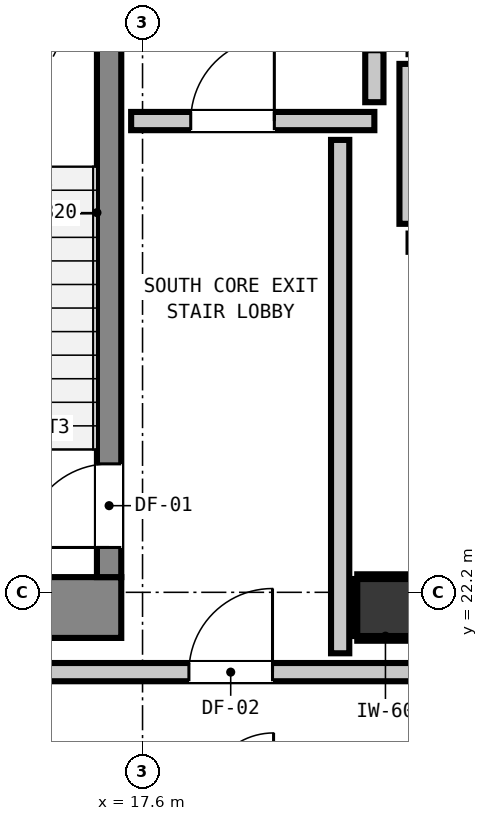
"""IFC4 building model, lengths in metres.
Left out: names, types, materials, properties, quantities, classifications, styles, units other than length and angle.
Written with IfcOpenShell. Run it as: python <this file> out.ifc"""

import sys

from ifc_helpers import new_model, si_unit, direction, frame, frame_2d, origin, origin_2d, place, context, subcontext, project, spatial, rectangle, extrude, element, fill, save


model = new_model("IFC4")
c1 = context("Model", 3, precision=1e-05, world=origin(), true_north=direction((0.0, 1.0)))
c2 = subcontext(c1, "Body", "Model", "MODEL_VIEW")
j1 = project(units=[si_unit("LENGTHUNIT", "METRE"), si_unit("PLANEANGLEUNIT", "RADIAN")], contexts=[c1])
p1 = place(None, origin())
s1 = spatial("IfcSite", under=j1, at=p1, CompositionType="ELEMENT")
p2 = place(p1, origin())
s2 = spatial("IfcBuilding", under=s1, at=p2, CompositionType="ELEMENT")
p3 = place(p2, frame((0.0, 0.0, 226.68)))
s3 = spatial("IfcBuildingStorey", under=s2, at=p3, CompositionType="ELEMENT", Elevation=226.68)
p4 = place(p3, frame((20.8, 22.0, 0.0), z_axis=(0.0, 0.0, 1.0), x_axis=(1.0, 0.0, 0.0)))
e1 = element("IfcColumn", 1, at=p4, inside=s3, PredefinedType="COLUMN", context=c2, shape_type="SweptSolid", body=[
    extrude(rectangle(XDim=0.75, YDim=0.75, at=origin_2d()), origin(), (0.0, 0.0, 1.0), 4.6),
])
p5 = place(p3, frame((13.24, 22.0, 0.0), z_axis=(0.0, 0.0, 1.0), x_axis=(1.0, 0.0, 0.0)))
e2 = element("IfcWall", 2, at=p5, inside=s3, PredefinedType="SHEAR", context=c2, shape_type="SweptSolid", body=[
    extrude(rectangle(XDim=4.08, YDim=0.8, at=frame_2d((2.04, 0.0))), origin(), (0.0, 0.0, 1.0), 4.6),
])
p6 = place(p3, frame((17.16, 22.4, 0.0), z_axis=(0.0, 0.0, 1.0), x_axis=(0.0, 1.0, 0.0)))
e3 = element("IfcWall", 3, at=p6, inside=s3, PredefinedType="SHEAR", context=c2, shape_type="SweptSolid", body=[
    extrude(rectangle(XDim=8.0, YDim=0.32, at=frame_2d((4.0, 0.0))), origin(), (0.0, 0.0, 1.0), 4.6),
])
p7 = place(p6, frame((0.39, 0.0, 0.0)))
e4 = element("IfcOpeningElement", 4, at=p7, cuts=e3, PredefinedType="OPENING", context=c2, shape_type="SweptSolid", body=[
    extrude(rectangle(XDim=1.1, YDim=2.15, at=frame_2d((0.55, 1.075))), frame((0.0, 0.17, 0.0), z_axis=(0.0, -1.0, 0.0), x_axis=(1.0, 0.0, 0.0)), (0.0, 0.0, 1.0), 0.34),
])
for number, where, z_axis, x_axis in (
    (5, (21.1, 26.8, 0.0), (0.0, 0.0, 1.0), (1.0, 0.0, 0.0)),
    (6, (21.1, 29.4, 0.0), (0.0, 0.0, 1.0), (1.0, 0.0, 0.0)),
):
    element("IfcWall", number, at=place(p3, frame(where, z_axis=z_axis, x_axis=x_axis)), inside=s3, PredefinedType="PARTITIONING", context=c2, shape_type="SweptSolid", body=[
        extrude(rectangle(XDim=2.2, YDim=0.24, at=frame_2d((1.1, 0.0))), origin(), (0.0, 0.0, 1.0), 4.18),
    ])
p8 = place(p3, frame((21.1, 27.048, 0.0), z_axis=(0.0, 0.0, 1.0), x_axis=(0.0, 1.0, 0.0)))
e7 = element("IfcWall", 7, at=p8, inside=s3, PredefinedType="PARTITIONING", context=c2, shape_type="SweptSolid", body=[
    extrude(rectangle(XDim=2.104, YDim=0.24, at=frame_2d((1.052, 0.0))), origin(), (0.0, 0.0, 1.0), 2.185),
])
p9 = place(p3, frame((10.787, 21.15, 0.0), z_axis=(0.0, 0.0, 1.0), x_axis=(1.0, 0.0, 0.0)))
e8 = element("IfcWall", 8, at=p9, inside=s3, PredefinedType="PARTITIONING", context=c2, shape_type="SweptSolid", body=[
    extrude(rectangle(XDim=36.626, YDim=0.24, at=frame_2d((18.313, 0.0))), origin(), (0.0, 0.0, 1.0), 4.18),
])
p10 = place(p9, frame((7.423, 0.0, 0.0)))
e9 = element("IfcOpeningElement", 9, at=p10, cuts=e8, PredefinedType="OPENING", context=c2, shape_type="SweptSolid", body=[
    extrude(rectangle(XDim=1.1, YDim=2.15, at=frame_2d((0.55, 1.075))), frame((0.0, 0.13, 0.0), z_axis=(0.0, -1.0, 0.0), x_axis=(1.0, 0.0, 0.0)), (0.0, 0.0, 1.0), 0.26),
])
p11 = place(p9, frame((1.012, 0.0, 0.0)))
e10 = element("IfcOpeningElement", 10, at=p11, cuts=e8, PredefinedType="OPENING", context=c2, shape_type="SweptSolid", body=[
    extrude(rectangle(XDim=1.0, YDim=2.15, at=frame_2d((0.5, 1.075))), frame((0.0, 0.13, 0.0), z_axis=(0.0, -1.0, 0.0), x_axis=(1.0, 0.0, 0.0)), (0.0, 0.0, 1.0), 0.26),
])
p12 = place(p9, frame((27.239, 0.0, 0.0)))
e11 = element("IfcOpeningElement", 11, at=p12, cuts=e8, PredefinedType="OPENING", context=c2, shape_type="SweptSolid", body=[
    extrude(rectangle(XDim=1.4, YDim=2.15, at=frame_2d((0.7, 1.075))), frame((0.0, 0.13, 0.0), z_axis=(0.0, -1.0, 0.0), x_axis=(1.0, 0.0, 0.0)), (0.0, 0.0, 1.0), 0.26),
])
p13 = place(p3, frame((17.45, 28.4, 0.0), z_axis=(0.0, 0.0, 1.0), x_axis=(1.0, 0.0, 0.0)))
e12 = element("IfcWall", 12, at=p13, inside=s3, PredefinedType="PARTITIONING", context=c2, shape_type="SweptSolid", body=[
    extrude(rectangle(XDim=3.2, YDim=0.24, at=frame_2d((1.6, 0.0))), origin(), (0.0, 0.0, 1.0), 4.18),
])
p14 = place(p13, frame((0.784, 0.0, 0.0)))
e13 = element("IfcOpeningElement", 13, at=p14, cuts=e12, PredefinedType="OPENING", context=c2, shape_type="SweptSolid", body=[
    extrude(rectangle(XDim=1.1, YDim=2.15, at=frame_2d((0.55, 1.075))), frame((0.0, 0.13, 0.0), z_axis=(0.0, -1.0, 0.0), x_axis=(1.0, 0.0, 0.0)), (0.0, 0.0, 1.0), 0.26),
])
p15 = place(p3, frame((20.2, 21.398, 0.0), z_axis=(0.0, 0.0, 1.0), x_axis=(0.0, 1.0, 0.0)))
e14 = element("IfcWall", 14, at=p15, inside=s3, PredefinedType="PARTITIONING", context=c2, shape_type="SweptSolid", body=[
    extrude(rectangle(XDim=6.754, YDim=0.24, at=frame_2d((3.377, 0.0))), origin(), (0.0, 0.0, 1.0), 2.185),
])
p16 = place(p3, frame((20.65, 28.648, 0.0), z_axis=(0.0, 0.0, 1.0), x_axis=(0.0, 1.0, 0.0)))
e15 = element("IfcWall", 15, at=p16, inside=s3, PredefinedType="PARTITIONING", context=c2, shape_type="SweptSolid", body=[
    extrude(rectangle(XDim=0.684, YDim=0.24, at=frame_2d((0.342, 0.0))), origin(), (0.0, 0.0, 1.0), 2.185),
])
for number, where, z_axis, x_axis in (
    (16, (20.425, 21.593, 0.0), (0.0, 0.0, 1.0), (1.0, 0.0, 0.0)),
    (17, (20.425, 22.407, 0.0), (0.0, 0.0, 1.0), (1.0, 0.0, 0.0)),
):
    element("IfcWall", number, at=place(p3, frame(where, z_axis=z_axis, x_axis=x_axis)), inside=s3, PredefinedType="PARTITIONING", context=c2, shape_type="SweptSolid", body=[
        extrude(rectangle(XDim=0.742, YDim=0.06, at=frame_2d((0.371, 0.0))), origin(), (0.0, 0.0, 1.0), 1.45),
    ])
p17 = place(p3, frame((20.393, 21.625, 0.0), z_axis=(0.0, 0.0, 1.0), x_axis=(0.0, 1.0, 0.0)))
e18 = element("IfcWall", 18, at=p17, inside=s3, PredefinedType="PARTITIONING", context=c2, shape_type="SweptSolid", body=[
    extrude(rectangle(XDim=0.75, YDim=0.06, at=frame_2d((0.375, 0.0))), origin(), (0.0, 0.0, 1.0), 1.45),
])
p18 = place(p7, origin())
e19 = element("IfcDoor", 19, at=p18, inside=s3, OperationType="SINGLE_SWING_LEFT", PredefinedType="DOOR", context=c2, shape_type="SweptSolid", body=[
    extrude(rectangle(XDim=1.1, YDim=2.15, at=frame_2d((0.55, 1.075))), frame((0.0, 0.025, 0.0), z_axis=(0.0, -1.0, 0.0), x_axis=(1.0, 0.0, 0.0)), (0.0, 0.0, 1.0), 0.05),
])
fill(e4, e19)
p19 = place(p14, origin())
e20 = element("IfcDoor", 20, at=p19, inside=s3, OperationType="SINGLE_SWING_RIGHT", PredefinedType="DOOR", context=c2, shape_type="SweptSolid", body=[
    extrude(rectangle(XDim=1.1, YDim=2.15, at=frame_2d((0.55, 1.075))), frame((0.0, 0.025, 0.0), z_axis=(0.0, -1.0, 0.0), x_axis=(1.0, 0.0, 0.0)), (0.0, 0.0, 1.0), 0.05),
])
fill(e13, e20)
p20 = place(p10, origin())
e21 = element("IfcDoor", 21, at=p20, inside=s3, OperationType="SINGLE_SWING_RIGHT", PredefinedType="DOOR", context=c2, shape_type="SweptSolid", body=[
    extrude(rectangle(XDim=1.1, YDim=2.15, at=frame_2d((0.55, 1.075))), frame((0.0, 0.025, 0.0), z_axis=(0.0, -1.0, 0.0), x_axis=(1.0, 0.0, 0.0)), (0.0, 0.0, 1.0), 0.05),
])
fill(e9, e21)
save(model, sys.argv[1])
